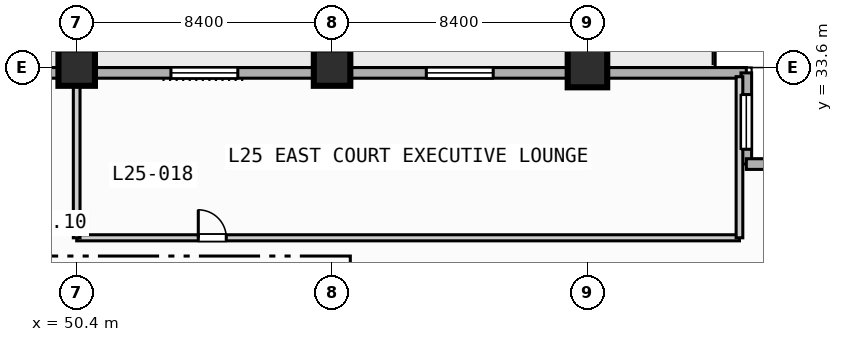
"""IFC4 building model, lengths in metres.
Left out: names, types, materials, properties, quantities, classifications, styles, units other than length and angle.
Written with IfcOpenShell. Run it as: python <this file> out.ifc"""

import sys

from ifc_helpers import new_model, si_unit, direction, frame, frame_2d, origin, origin_2d, place, context, subcontext, project, spatial, rectangle, extrude, element, fill, save


model = new_model("IFC4")
c1 = context("Model", 3, precision=1e-05, world=origin(), true_north=direction((0.0, 1.0)))
c2 = subcontext(c1, "Body", "Model", "MODEL_VIEW")
j1 = project(units=[si_unit("LENGTHUNIT", "METRE"), si_unit("PLANEANGLEUNIT", "RADIAN")], contexts=[c1])
p1 = place(None, origin())
s1 = spatial("IfcSite", under=j1, at=p1, CompositionType="ELEMENT")
p2 = place(p1, origin())
s2 = spatial("IfcBuilding", under=s1, at=p2, CompositionType="ELEMENT")
p3 = place(p2, frame((0.0, 0.0, 107.6)))
s3 = spatial("IfcBuildingStorey", under=s2, at=p3, CompositionType="ELEMENT", Elevation=107.6)
for number, where, z_axis, x_axis in (
    (1, (50.4, 33.6, 0.0), (0.0, 0.0, 1.0), (1.0, 0.0, 0.0)),
    (2, (58.8, 33.6, 0.0), (0.0, 0.0, 1.0), (1.0, 0.0, 0.0)),
):
    element("IfcColumn", number, at=place(p3, frame(where, z_axis=z_axis, x_axis=x_axis)), inside=s3, PredefinedType="COLUMN", context=c2, shape_type="SweptSolid", body=[
        extrude(rectangle(XDim=1.2, YDim=1.2, at=origin_2d()), origin(), (0.0, 0.0, 1.0), 3.8),
    ])
p4 = place(p3, frame((67.2, 33.6, 0.0), z_axis=(0.0, 0.0, 1.0), x_axis=(1.0, 0.0, 0.0)))
e3 = element("IfcColumn", 3, at=p4, inside=s3, PredefinedType="COLUMN", context=c2, shape_type="SweptSolid", body=[
    extrude(rectangle(XDim=1.3, YDim=1.3, at=origin_2d()), origin(), (0.0, 0.0, 1.0), 3.8),
])
p5 = place(p3, frame((33.425, 33.425, 0.0), z_axis=(0.0, 0.0, 1.0), x_axis=(1.0, 0.0, 0.0)))
e4 = element("IfcWall", 4, at=p5, inside=s3, PredefinedType="STANDARD", context=c2, shape_type="SweptSolid", body=[
    extrude(rectangle(XDim=39.0, YDim=0.35, at=frame_2d((19.5, 0.0))), origin(), (0.0, 0.0, 1.0), 3.55),
])
p6 = place(p5, frame((12.075, 0.0, 0.0)))
e5 = element("IfcOpeningElement", 5, at=p6, cuts=e4, PredefinedType="OPENING", context=c2, shape_type="SweptSolid", body=[
    extrude(rectangle(XDim=1.4, YDim=2.2, at=frame_2d((0.7, 1.1))), frame((0.0, 0.185, 0.0), z_axis=(0.0, -1.0, 0.0), x_axis=(1.0, 0.0, 0.0)), (0.0, 0.0, 1.0), 0.37),
])
p7 = place(p5, frame((20.075, 0.0, 0.85)))
e6 = element("IfcOpeningElement", 6, at=p7, cuts=e4, PredefinedType="OPENING", context=c2, shape_type="SweptSolid", body=[
    extrude(rectangle(XDim=2.2, YDim=1.8, at=frame_2d((1.1, 0.9))), frame((0.0, 0.185, 0.0), z_axis=(0.0, -1.0, 0.0), x_axis=(1.0, 0.0, 0.0)), (0.0, 0.0, 1.0), 0.37),
])
p8 = place(p5, frame((28.475, 0.0, 0.85)))
e7 = element("IfcOpeningElement", 7, at=p8, cuts=e4, PredefinedType="OPENING", context=c2, shape_type="SweptSolid", body=[
    extrude(rectangle(XDim=2.2, YDim=1.8, at=frame_2d((1.1, 0.9))), frame((0.0, 0.185, 0.0), z_axis=(0.0, -1.0, 0.0), x_axis=(1.0, 0.0, 0.0)), (0.0, 0.0, 1.0), 0.37),
])
p9 = place(p3, frame((72.425, 33.425, 0.0), z_axis=(0.0, 0.0, 1.0), x_axis=(0.0, -1.0, 0.0)))
e8 = element("IfcWall", 8, at=p9, inside=s3, PredefinedType="STANDARD", context=c2, shape_type="SweptSolid", body=[
    extrude(rectangle(XDim=3.0, YDim=0.35, at=frame_2d((1.5, 0.0))), origin(), (0.0, 0.0, 1.0), 3.55),
])
p10 = place(p9, frame((0.712, 0.0, 0.85)))
e9 = element("IfcOpeningElement", 9, at=p10, cuts=e8, PredefinedType="OPENING", context=c2, shape_type="SweptSolid", body=[
    extrude(rectangle(XDim=1.8, YDim=1.8, at=frame_2d((0.9, 0.9))), frame((0.0, 0.185, 0.0), z_axis=(0.0, -1.0, 0.0), x_axis=(1.0, 0.0, 0.0)), (0.0, 0.0, 1.0), 0.37),
])
p11 = place(p3, frame((72.425, 30.425, 0.0), z_axis=(0.0, 0.0, 1.0), x_axis=(1.0, 0.0, 0.0)))
e10 = element("IfcWall", 10, at=p11, inside=s3, PredefinedType="STANDARD", context=c2, shape_type="SweptSolid", body=[
    extrude(rectangle(XDim=3.0, YDim=0.35, at=frame_2d((1.5, 0.0))), origin(), (0.0, 0.0, 1.0), 3.55),
])
p12 = place(p3, frame((50.4, 28.0, 0.0), z_axis=(0.0, 0.0, 1.0), x_axis=(1.0, 0.0, 0.0)))
e11 = element("IfcWall", 11, at=p12, inside=s3, PredefinedType="PARTITIONING", context=c2, shape_type="SweptSolid", body=[
    extrude(rectangle(XDim=21.8, YDim=0.2, at=frame_2d((10.9, 0.0))), origin(), (0.0, 0.0, 1.0), 3.55),
])
p13 = place(p12, frame((4.0, 0.0, 0.0)))
e12 = element("IfcOpeningElement", 12, at=p13, cuts=e11, PredefinedType="OPENING", context=c2, shape_type="SweptSolid", body=[
    extrude(rectangle(XDim=0.92, YDim=2.1, at=frame_2d((0.46, 1.05))), frame((0.0, 0.11, 0.0), z_axis=(0.0, -1.0, 0.0), x_axis=(1.0, 0.0, 0.0)), (0.0, 0.0, 1.0), 0.22),
])
p14 = place(p3, frame((50.4, 28.0, 0.0), z_axis=(0.0, 0.0, 1.0), x_axis=(0.0, 1.0, 0.0)))
e13 = element("IfcWall", 13, at=p14, inside=s3, PredefinedType="PARTITIONING", context=c2, shape_type="SweptSolid", body=[
    extrude(rectangle(XDim=5.3, YDim=0.22, at=frame_2d((2.65, 0.0))), origin(), (0.0, 0.0, 1.0), 2.933),
])
p15 = place(p3, frame((72.2, 28.0, 0.0), z_axis=(0.0, 0.0, 1.0), x_axis=(0.0, 1.0, 0.0)))
e14 = element("IfcWall", 14, at=p15, inside=s3, PredefinedType="PARTITIONING", context=c2, shape_type="SweptSolid", body=[
    extrude(rectangle(XDim=5.3, YDim=0.22, at=frame_2d((2.65, 0.0))), origin(), (0.0, 0.0, 1.0), 3.55),
])
p16 = place(p7, origin())
e15 = element("IfcWindow", 15, at=p16, inside=s3, PartitioningType="SINGLE_PANEL", PredefinedType="WINDOW", context=c2, shape_type="SweptSolid", body=[
    extrude(rectangle(XDim=2.2, YDim=1.8, at=frame_2d((1.1, 0.9))), frame((0.0, 0.03, 0.0), z_axis=(0.0, -1.0, 0.0), x_axis=(1.0, 0.0, 0.0)), (0.0, 0.0, 1.0), 0.06),
])
fill(e6, e15)
p17 = place(p8, origin())
e16 = element("IfcWindow", 16, at=p17, inside=s3, PartitioningType="SINGLE_PANEL", PredefinedType="WINDOW", context=c2, shape_type="SweptSolid", body=[
    extrude(rectangle(XDim=2.2, YDim=1.8, at=frame_2d((1.1, 0.9))), frame((0.0, 0.03, 0.0), z_axis=(0.0, -1.0, 0.0), x_axis=(1.0, 0.0, 0.0)), (0.0, 0.0, 1.0), 0.06),
])
fill(e7, e16)
p18 = place(p10, origin())
e17 = element("IfcWindow", 17, at=p18, inside=s3, PartitioningType="SINGLE_PANEL", PredefinedType="WINDOW", context=c2, shape_type="SweptSolid", body=[
    extrude(rectangle(XDim=1.8, YDim=1.8, at=frame_2d((0.9, 0.9))), frame((0.0, 0.03, 0.0), z_axis=(0.0, -1.0, 0.0), x_axis=(1.0, 0.0, 0.0)), (0.0, 0.0, 1.0), 0.06),
])
fill(e9, e17)
p19 = place(p13, origin())
e18 = element("IfcDoor", 18, at=p19, inside=s3, OperationType="SINGLE_SWING_LEFT", PredefinedType="DOOR", context=c2, shape_type="SweptSolid", body=[
    extrude(rectangle(XDim=0.92, YDim=2.1, at=frame_2d((0.46, 1.05))), frame((0.0, 0.025, 0.0), z_axis=(0.0, -1.0, 0.0), x_axis=(1.0, 0.0, 0.0)), (0.0, 0.0, 1.0), 0.05),
])
fill(e12, e18)
save(model, sys.argv[1])
